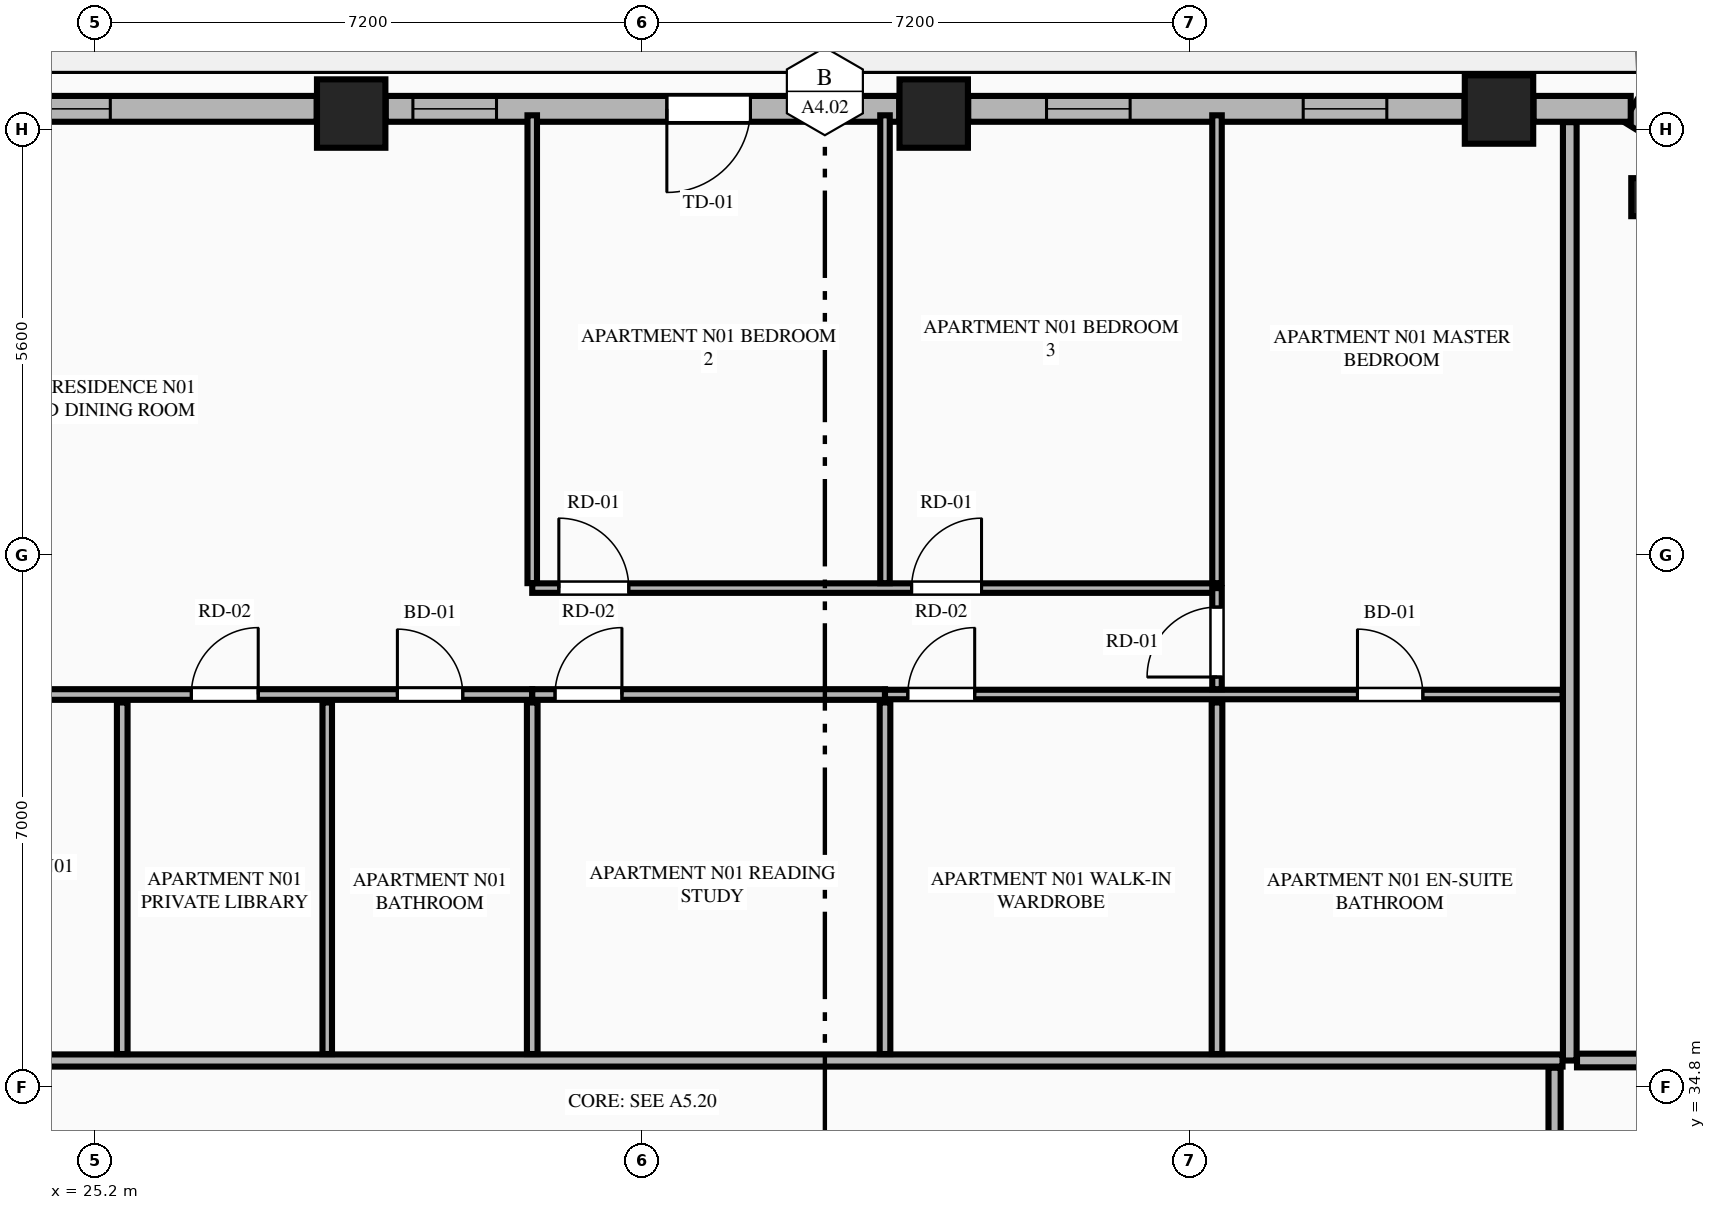
"""IFC4 building model, lengths in metres.
Left out: names, types, materials, properties, quantities, classifications, styles, units other than length and angle.
Written with IfcOpenShell. Run it as: python <this file> out.ifc"""

import sys

from ifc_helpers import new_model, si_unit, direction, frame, frame_2d, origin, origin_2d, place, context, subcontext, project, spatial, rectangle, extrude, element, fill, save


model = new_model("IFC4")
c1 = context("Model", 3, precision=1e-05, world=origin(), true_north=direction((0.0, 1.0)))
c2 = subcontext(c1, "Body", "Model", "MODEL_VIEW")
j1 = project(units=[si_unit("LENGTHUNIT", "METRE"), si_unit("PLANEANGLEUNIT", "RADIAN")], contexts=[c1])
p1 = place(None, origin())
s1 = spatial("IfcSite", under=j1, at=p1, CompositionType="ELEMENT")
p2 = place(p1, origin())
s2 = spatial("IfcBuilding", under=s1, at=p2, CompositionType="ELEMENT")
p3 = place(p2, frame((0.0, 0.0, 157.05)))
s3 = spatial("IfcBuildingStorey", under=s2, at=p3, CompositionType="ELEMENT", Elevation=157.05)
for number, where, z_axis, x_axis in (
    (1, (43.669, 47.661, 0.0), (0.0, 0.0, 1.0), (1.0, 0.0, 0.0)),
    (2, (36.232, 47.608, 0.0), (0.0, 0.0, 1.0), (1.0, 0.0, 0.0)),
    (3, (28.568, 47.608, 0.0), (0.0, 0.0, 1.0), (1.0, 0.0, 0.0)),
):
    element("IfcColumn", number, at=place(p3, frame(where, z_axis=z_axis, x_axis=x_axis)), inside=s3, PredefinedType="COLUMN", context=c2, shape_type="SweptSolid", body=[
        extrude(rectangle(XDim=0.9, YDim=0.9, at=origin_2d()), origin(), (0.0, 0.0, 1.0), 3.55),
    ])
p4 = place(p3, frame((45.659, 46.508, 0.0), z_axis=(0.0, 0.0, 1.0), x_axis=(-0.865160173452, 0.501495637342, 0.0)))
e4 = element("IfcColumn", 4, at=p4, inside=s3, PredefinedType="PILASTER", context=c2, shape_type="SweptSolid", body=[
    extrude(rectangle(XDim=0.5, YDim=0.35, at=origin_2d()), origin(), (0.0, 0.0, 1.0), 3.55),
])
p5 = place(p3, frame((46.971, 46.677, 0.0), z_axis=(0.0, 0.0, 1.0), x_axis=(-0.851798915137, 0.523868884523, 0.0)))
e5 = element("IfcWall", 5, at=p5, inside=s3, PredefinedType="STANDARD", context=c2, shape_type="SweptSolid", body=[
    extrude(rectangle(XDim=1.848, YDim=0.34, at=frame_2d((0.924, 0.0))), origin(), (0.0, 0.0, 1.0), 3.34),
])
p6 = place(p3, frame((45.402, 47.67, 0.0), z_axis=(0.0, 0.0, 1.0), x_axis=(-1.0, 0.0, 0.0)))
e6 = element("IfcWall", 6, at=p6, inside=s3, PredefinedType="STANDARD", context=c2, shape_type="SweptSolid", body=[
    extrude(rectangle(XDim=1.279, YDim=0.34, at=frame_2d((0.64, 0.0))), origin(), (0.0, 0.0, 1.0), 3.34),
])
p7 = place(p3, frame((43.215, 47.67, 0.0), z_axis=(0.0, 0.0, 1.0), x_axis=(-1.0, 0.0, 0.0)))
e7 = element("IfcWall", 7, at=p7, inside=s3, PredefinedType="STANDARD", context=c2, shape_type="SweptSolid", body=[
    extrude(rectangle(XDim=6.529, YDim=0.34, at=frame_2d((3.265, 0.0))), origin(), (0.0, 0.0, 1.0), 2.797),
])
p8 = place(p7, frame((1.022, 0.0, 0.75)))
e8 = element("IfcOpeningElement", 8, at=p8, cuts=e7, PredefinedType="OPENING", context=c2, shape_type="SweptSolid", body=[
    extrude(rectangle(XDim=1.1, YDim=1.897, at=frame_2d((0.55, 0.948))), frame((0.0, 0.18, 0.0), z_axis=(0.0, -1.0, 0.0), x_axis=(1.0, 0.0, 0.0)), (0.0, 0.0, 1.0), 0.36),
])
p9 = place(p7, frame((4.399, 0.0, 0.75)))
e9 = element("IfcOpeningElement", 9, at=p9, cuts=e7, PredefinedType="OPENING", context=c2, shape_type="SweptSolid", body=[
    extrude(rectangle(XDim=1.1, YDim=1.897, at=frame_2d((0.55, 0.948))), frame((0.0, 0.18, 0.0), z_axis=(0.0, -1.0, 0.0), x_axis=(1.0, 0.0, 0.0)), (0.0, 0.0, 1.0), 0.36),
])
p10 = place(p3, frame((35.778, 47.67, 0.0), z_axis=(0.0, 0.0, 1.0), x_axis=(-1.0, 0.0, 0.0)))
e10 = element("IfcWall", 10, at=p10, inside=s3, PredefinedType="STANDARD", context=c2, shape_type="SweptSolid", body=[
    extrude(rectangle(XDim=6.756, YDim=0.34, at=frame_2d((3.378, 0.0))), origin(), (0.0, 0.0, 1.0), 2.797),
])
p11 = place(p10, frame((1.957, 0.0, 0.0)))
e11 = element("IfcOpeningElement", 11, at=p11, cuts=e10, PredefinedType="OPENING", context=c2, shape_type="SweptSolid", body=[
    extrude(rectangle(XDim=1.1, YDim=2.25, at=frame_2d((0.55, 1.125))), frame((0.0, 0.18, 0.0), z_axis=(0.0, -1.0, 0.0), x_axis=(1.0, 0.0, 0.0)), (0.0, 0.0, 1.0), 0.36),
])
p12 = place(p10, frame((5.298, 0.0, 0.75)))
e12 = element("IfcOpeningElement", 12, at=p12, cuts=e10, PredefinedType="OPENING", context=c2, shape_type="SweptSolid", body=[
    extrude(rectangle(XDim=1.1, YDim=1.897, at=frame_2d((0.55, 0.948))), frame((0.0, 0.18, 0.0), z_axis=(0.0, -1.0, 0.0), x_axis=(1.0, 0.0, 0.0)), (0.0, 0.0, 1.0), 0.36),
])
p13 = place(p3, frame((28.114, 47.67, 0.0), z_axis=(0.0, 0.0, 1.0), x_axis=(-1.0, 0.0, 0.0)))
e13 = element("IfcWall", 13, at=p13, inside=s3, PredefinedType="STANDARD", context=c2, shape_type="SweptSolid", body=[
    extrude(rectangle(XDim=6.529, YDim=0.34, at=frame_2d((3.265, 0.0))), origin(), (0.0, 0.0, 1.0), 2.797),
])
p14 = place(p13, frame((2.715, 0.0, 0.75)))
e14 = element("IfcOpeningElement", 14, at=p14, cuts=e13, PredefinedType="OPENING", context=c2, shape_type="SweptSolid", body=[
    extrude(rectangle(XDim=1.1, YDim=1.897, at=frame_2d((0.55, 0.948))), frame((0.0, 0.18, 0.0), z_axis=(0.0, -1.0, 0.0), x_axis=(1.0, 0.0, 0.0)), (0.0, 0.0, 1.0), 0.36),
])
p15 = place(p3, frame((44.6, 35.15, 0.0), z_axis=(0.0, 0.0, 1.0), x_axis=(0.0, 1.0, 0.0)))
e15 = element("IfcWall", 15, at=p15, inside=s3, PredefinedType="PARTITIONING", context=c2, shape_type="SweptSolid", body=[
    extrude(rectangle(XDim=12.345, YDim=0.18, at=frame_2d((6.173, 0.0))), origin(), (0.0, 0.0, 1.0), 3.34),
])
p16 = place(p3, frame((20.295, 35.15, 0.0), z_axis=(0.0, 0.0, 1.0), x_axis=(1.0, 0.0, 0.0)))
e16 = element("IfcWall", 16, at=p16, inside=s3, PredefinedType="PARTITIONING", context=c2, shape_type="SweptSolid", body=[
    extrude(rectangle(XDim=24.21, YDim=0.16, at=frame_2d((12.105, 0.0))), origin(), (0.0, 0.0, 1.0), 3.34),
])
p17 = place(p16, frame((0.405, 0.0, 0.0)))
e17 = element("IfcOpeningElement", 17, at=p17, cuts=e16, PredefinedType="OPENING", context=c2, shape_type="SweptSolid", body=[
    extrude(rectangle(XDim=1.35, YDim=2.35, at=frame_2d((0.675, 1.175))), frame((0.0, 0.09, 0.0), z_axis=(0.0, -1.0, 0.0), x_axis=(1.0, 0.0, 0.0)), (0.0, 0.0, 1.0), 0.18),
])
p18 = place(p3, frame((22.25, 39.965, 0.0), z_axis=(0.0, 0.0, 1.0), x_axis=(1.0, 0.0, 0.0)))
e18 = element("IfcWall", 18, at=p18, inside=s3, PredefinedType="PLUMBINGWALL", context=c2, shape_type="SweptSolid", body=[
    extrude(rectangle(XDim=8.7, YDim=0.14, at=frame_2d((4.35, 0.0))), origin(), (0.0, 0.0, 1.0), 3.34),
])
p19 = place(p18, frame((6.926, 0.0, 0.0)))
e19 = element("IfcOpeningElement", 19, at=p19, cuts=e18, PredefinedType="OPENING", context=c2, shape_type="SweptSolid", body=[
    extrude(rectangle(XDim=0.86, YDim=2.1, at=frame_2d((0.43, 1.05))), frame((0.0, 0.08, 0.0), z_axis=(0.0, -1.0, 0.0), x_axis=(1.0, 0.0, 0.0)), (0.0, 0.0, 1.0), 0.16),
])
p20 = place(p18, frame((0.26, 0.0, 0.0)))
e20 = element("IfcOpeningElement", 20, at=p20, cuts=e18, PredefinedType="OPENING", context=c2, shape_type="SweptSolid", body=[
    extrude(rectangle(XDim=0.88, YDim=2.15, at=frame_2d((0.44, 1.075))), frame((0.0, 0.08, 0.0), z_axis=(0.0, -1.0, 0.0), x_axis=(1.0, 0.0, 0.0)), (0.0, 0.0, 1.0), 0.16),
])
p21 = place(p18, frame((4.215, 0.0, 0.0)))
e21 = element("IfcOpeningElement", 21, at=p21, cuts=e18, PredefinedType="OPENING", context=c2, shape_type="SweptSolid", body=[
    extrude(rectangle(XDim=0.88, YDim=2.15, at=frame_2d((0.44, 1.075))), frame((0.0, 0.08, 0.0), z_axis=(0.0, -1.0, 0.0), x_axis=(1.0, 0.0, 0.0)), (0.0, 0.0, 1.0), 0.16),
])
p22 = place(p3, frame((30.95, 39.965, 0.0), z_axis=(0.0, 0.0, 1.0), x_axis=(1.0, 0.0, 0.0)))
e22 = element("IfcWall", 22, at=p22, inside=s3, PredefinedType="PLUMBINGWALL", context=c2, shape_type="SweptSolid", body=[
    extrude(rectangle(XDim=4.641, YDim=0.14, at=frame_2d((2.321, 0.0))), origin(), (0.0, 0.0, 1.0), 3.34),
])
p23 = place(p22, frame((0.3, 0.0, 0.0)))
e23 = element("IfcOpeningElement", 23, at=p23, cuts=e22, PredefinedType="OPENING", context=c2, shape_type="SweptSolid", body=[
    extrude(rectangle(XDim=0.88, YDim=2.15, at=frame_2d((0.44, 1.075))), frame((0.0, 0.08, 0.0), z_axis=(0.0, -1.0, 0.0), x_axis=(1.0, 0.0, 0.0)), (0.0, 0.0, 1.0), 0.16),
])
p24 = place(p3, frame((35.591, 39.965, 0.0), z_axis=(0.0, 0.0, 1.0), x_axis=(1.0, 0.0, 0.0)))
e24 = element("IfcWall", 24, at=p24, inside=s3, PredefinedType="PARTITIONING", context=c2, shape_type="SweptSolid", body=[
    extrude(rectangle(XDim=8.914, YDim=0.125, at=frame_2d((4.457, 0.0))), origin(), (0.0, 0.0, 1.0), 3.34),
])
p25 = place(p24, frame((6.216, 0.0, 0.0)))
e25 = element("IfcOpeningElement", 25, at=p25, cuts=e24, PredefinedType="OPENING", context=c2, shape_type="SweptSolid", body=[
    extrude(rectangle(XDim=0.86, YDim=2.1, at=frame_2d((0.43, 1.05))), frame((0.0, 0.073, 0.0), z_axis=(0.0, -1.0, 0.0), x_axis=(1.0, 0.0, 0.0)), (0.0, 0.0, 1.0), 0.145),
])
p26 = place(p24, frame((0.3, 0.0, 0.0)))
e26 = element("IfcOpeningElement", 26, at=p26, cuts=e24, PredefinedType="OPENING", context=c2, shape_type="SweptSolid", body=[
    extrude(rectangle(XDim=0.88, YDim=2.15, at=frame_2d((0.44, 1.075))), frame((0.0, 0.073, 0.0), z_axis=(0.0, -1.0, 0.0), x_axis=(1.0, 0.0, 0.0)), (0.0, 0.0, 1.0), 0.145),
])
p27 = place(p3, frame((25.556, 35.235, 0.0), z_axis=(0.0, 0.0, 1.0), x_axis=(0.0, 1.0, 0.0)))
e27 = element("IfcWall", 27, at=p27, inside=s3, PredefinedType="PLUMBINGWALL", context=c2, shape_type="SweptSolid", body=[
    extrude(rectangle(XDim=4.625, YDim=0.14, at=frame_2d((2.312, 0.0))), origin(), (0.0, 0.0, 1.0), 3.34),
])
p28 = place(p3, frame((28.253, 35.235, 0.0), z_axis=(0.0, 0.0, 1.0), x_axis=(0.0, 1.0, 0.0)))
e28 = element("IfcWall", 28, at=p28, inside=s3, PredefinedType="PARTITIONING", context=c2, shape_type="SweptSolid", body=[
    extrude(rectangle(XDim=4.625, YDim=0.125, at=frame_2d((2.312, 0.0))), origin(), (0.0, 0.0, 1.0), 3.34),
])
p29 = place(p3, frame((30.95, 41.43, 0.0), z_axis=(0.0, 0.0, 1.0), x_axis=(0.0, 1.0, 0.0)))
e29 = element("IfcWall", 29, at=p29, inside=s3, PredefinedType="PARTITIONING", context=c2, shape_type="SweptSolid", body=[
    extrude(rectangle(XDim=6.155, YDim=0.125, at=frame_2d((3.078, 0.0))), origin(), (0.0, 0.0, 1.0), 3.34),
])
p30 = place(p3, frame((30.95, 41.365, 0.0), z_axis=(0.0, 0.0, 1.0), x_axis=(1.0, 0.0, 0.0)))
e30 = element("IfcWall", 30, at=p30, inside=s3, PredefinedType="PARTITIONING", context=c2, shape_type="SweptSolid", body=[
    extrude(rectangle(XDim=9.009, YDim=0.125, at=frame_2d((4.504, 0.0))), origin(), (0.0, 0.0, 1.0), 3.34),
])
p31 = place(p30, frame((0.35, 0.0, 0.0)))
e31 = element("IfcOpeningElement", 31, at=p31, cuts=e30, PredefinedType="OPENING", context=c2, shape_type="SweptSolid", body=[
    extrude(rectangle(XDim=0.92, YDim=2.15, at=frame_2d((0.46, 1.075))), frame((0.0, 0.073, 0.0), z_axis=(0.0, -1.0, 0.0), x_axis=(1.0, 0.0, 0.0)), (0.0, 0.0, 1.0), 0.145),
])
p32 = place(p30, frame((4.991, 0.0, 0.0)))
e32 = element("IfcOpeningElement", 32, at=p32, cuts=e30, PredefinedType="OPENING", context=c2, shape_type="SweptSolid", body=[
    extrude(rectangle(XDim=0.92, YDim=2.15, at=frame_2d((0.46, 1.075))), frame((0.0, 0.073, 0.0), z_axis=(0.0, -1.0, 0.0), x_axis=(1.0, 0.0, 0.0)), (0.0, 0.0, 1.0), 0.145),
])
p33 = place(p3, frame((39.959, 40.035, 0.0), z_axis=(0.0, 0.0, 1.0), x_axis=(0.0, 1.0, 0.0)))
e33 = element("IfcWall", 33, at=p33, inside=s3, PredefinedType="PARTITIONING", context=c2, shape_type="SweptSolid", body=[
    extrude(rectangle(XDim=1.33, YDim=0.125, at=frame_2d((0.665, 0.0))), origin(), (0.0, 0.0, 1.0), 3.34),
])
p34 = place(p33, frame((0.16, 0.0, 0.0)))
e34 = element("IfcOpeningElement", 34, at=p34, cuts=e33, PredefinedType="OPENING", context=c2, shape_type="SweptSolid", body=[
    extrude(rectangle(XDim=0.92, YDim=2.15, at=frame_2d((0.46, 1.075))), frame((0.0, 0.073, 0.0), z_axis=(0.0, -1.0, 0.0), x_axis=(1.0, 0.0, 0.0)), (0.0, 0.0, 1.0), 0.145),
])
for number, where, z_axis, x_axis in (
    (35, (30.95, 35.235, 0.0), (0.0, 0.0, 1.0), (0.0, 1.0, 0.0)),
    (36, (35.591, 35.235, 0.0), (0.0, 0.0, 1.0), (0.0, 1.0, 0.0)),
):
    element("IfcWall", number, at=place(p3, frame(where, z_axis=z_axis, x_axis=x_axis)), inside=s3, PredefinedType="PLUMBINGWALL", context=c2, shape_type="SweptSolid", body=[
        extrude(rectangle(XDim=4.625, YDim=0.14, at=frame_2d((2.312, 0.0))), origin(), (0.0, 0.0, 1.0), 3.34),
    ])
for number, where, z_axis, x_axis in (
    (37, (35.591, 41.43, 0.0), (0.0, 0.0, 1.0), (0.0, 1.0, 0.0)),
    (38, (39.959, 41.43, 0.0), (0.0, 0.0, 1.0), (0.0, 1.0, 0.0)),
):
    element("IfcWall", number, at=place(p3, frame(where, z_axis=z_axis, x_axis=x_axis)), inside=s3, PredefinedType="PARTITIONING", context=c2, shape_type="SweptSolid", body=[
        extrude(rectangle(XDim=6.155, YDim=0.125, at=frame_2d((3.078, 0.0))), origin(), (0.0, 0.0, 1.0), 3.34),
    ])
p35 = place(p3, frame((39.959, 35.235, 0.0), z_axis=(0.0, 0.0, 1.0), x_axis=(0.0, 1.0, 0.0)))
e39 = element("IfcWall", 39, at=p35, inside=s3, PredefinedType="PLUMBINGWALL", context=c2, shape_type="SweptSolid", body=[
    extrude(rectangle(XDim=4.625, YDim=0.14, at=frame_2d((2.312, 0.0))), origin(), (0.0, 0.0, 1.0), 3.34),
])
p36 = place(p3, frame((44.695, 35.15, 0.0), z_axis=(0.0, 0.0, 1.0), x_axis=(1.0, 0.0, 0.0)))
e40 = element("IfcWall", 40, at=p36, inside=s3, PredefinedType="PARTITIONING", context=c2, shape_type="SweptSolid", body=[
    extrude(rectangle(XDim=7.895, YDim=0.18, at=frame_2d((3.948, 0.0))), origin(), (0.0, 0.0, 1.0), 3.34),
])
p37 = place(p3, frame((44.4, 16.745, 0.0), z_axis=(0.0, 0.0, 1.0), x_axis=(0.0, 1.0, 0.0)))
e41 = element("IfcWall", 41, at=p37, inside=s3, PredefinedType="PARTITIONING", context=c2, shape_type="SweptSolid", body=[
    extrude(rectangle(XDim=18.31, YDim=0.16, at=frame_2d((9.155, 0.0))), origin(), (0.0, 0.0, 1.0), 3.34),
])
p38 = place(p37, frame((0.45, 0.0, 0.0)))
e42 = element("IfcOpeningElement", 42, at=p38, cuts=e41, PredefinedType="OPENING", context=c2, shape_type="SweptSolid", body=[
    extrude(rectangle(XDim=1.02, YDim=2.25, at=frame_2d((0.51, 1.125))), frame((0.0, 0.09, 0.0), z_axis=(0.0, -1.0, 0.0), x_axis=(1.0, 0.0, 0.0)), (0.0, 0.0, 1.0), 0.18),
])
p39 = place(p8, origin())
e43 = element("IfcWindow", 43, at=p39, inside=s3, PartitioningType="SINGLE_PANEL", PredefinedType="WINDOW", context=c2, shape_type="SweptSolid", body=[
    extrude(rectangle(XDim=1.1, YDim=1.897, at=frame_2d((0.55, 0.948))), frame((0.0, 0.03, 0.0), z_axis=(0.0, -1.0, 0.0), x_axis=(1.0, 0.0, 0.0)), (0.0, 0.0, 1.0), 0.06),
])
fill(e8, e43)
p40 = place(p11, origin())
e44 = element("IfcDoor", 44, at=p40, inside=s3, OperationType="SINGLE_SWING_RIGHT", PredefinedType="DOOR", context=c2, shape_type="SweptSolid", body=[
    extrude(rectangle(XDim=1.1, YDim=2.25, at=frame_2d((0.55, 1.125))), frame((0.0, 0.025, 0.0), z_axis=(0.0, -1.0, 0.0), x_axis=(1.0, 0.0, 0.0)), (0.0, 0.0, 1.0), 0.05),
])
fill(e11, e44)
p41 = place(p14, origin())
e45 = element("IfcWindow", 45, at=p41, inside=s3, PartitioningType="SINGLE_PANEL", PredefinedType="WINDOW", context=c2, shape_type="SweptSolid", body=[
    extrude(rectangle(XDim=1.1, YDim=1.897, at=frame_2d((0.55, 0.948))), frame((0.0, 0.03, 0.0), z_axis=(0.0, -1.0, 0.0), x_axis=(1.0, 0.0, 0.0)), (0.0, 0.0, 1.0), 0.06),
])
fill(e14, e45)
p42 = place(p19, origin())
e46 = element("IfcDoor", 46, at=p42, inside=s3, OperationType="SINGLE_SWING_LEFT", PredefinedType="DOOR", context=c2, shape_type="SweptSolid", body=[
    extrude(rectangle(XDim=0.86, YDim=2.1, at=frame_2d((0.43, 1.05))), frame((0.0, 0.025, 0.0), z_axis=(0.0, -1.0, 0.0), x_axis=(1.0, 0.0, 0.0)), (0.0, 0.0, 1.0), 0.05),
])
fill(e19, e46)
p43 = place(p25, origin())
e47 = element("IfcDoor", 47, at=p43, inside=s3, OperationType="SINGLE_SWING_LEFT", PredefinedType="DOOR", context=c2, shape_type="SweptSolid", body=[
    extrude(rectangle(XDim=0.86, YDim=2.1, at=frame_2d((0.43, 1.05))), frame((0.0, 0.025, 0.0), z_axis=(0.0, -1.0, 0.0), x_axis=(1.0, 0.0, 0.0)), (0.0, 0.0, 1.0), 0.05),
])
fill(e25, e47)
p44 = place(p21, origin())
e48 = element("IfcDoor", 48, at=p44, inside=s3, OperationType="SINGLE_SWING_RIGHT", PredefinedType="DOOR", context=c2, shape_type="SweptSolid", body=[
    extrude(rectangle(XDim=0.88, YDim=2.15, at=frame_2d((0.44, 1.075))), frame((0.0, 0.025, 0.0), z_axis=(0.0, -1.0, 0.0), x_axis=(1.0, 0.0, 0.0)), (0.0, 0.0, 1.0), 0.05),
])
fill(e21, e48)
p45 = place(p23, origin())
e49 = element("IfcDoor", 49, at=p45, inside=s3, OperationType="SINGLE_SWING_RIGHT", PredefinedType="DOOR", context=c2, shape_type="SweptSolid", body=[
    extrude(rectangle(XDim=0.88, YDim=2.15, at=frame_2d((0.44, 1.075))), frame((0.0, 0.025, 0.0), z_axis=(0.0, -1.0, 0.0), x_axis=(1.0, 0.0, 0.0)), (0.0, 0.0, 1.0), 0.05),
])
fill(e23, e49)
p46 = place(p31, origin())
e50 = element("IfcDoor", 50, at=p46, inside=s3, OperationType="SINGLE_SWING_LEFT", PredefinedType="DOOR", context=c2, shape_type="SweptSolid", body=[
    extrude(rectangle(XDim=0.92, YDim=2.15, at=frame_2d((0.46, 1.075))), frame((0.0, 0.025, 0.0), z_axis=(0.0, -1.0, 0.0), x_axis=(1.0, 0.0, 0.0)), (0.0, 0.0, 1.0), 0.05),
])
fill(e31, e50)
p47 = place(p32, origin())
e51 = element("IfcDoor", 51, at=p47, inside=s3, OperationType="SINGLE_SWING_RIGHT", PredefinedType="DOOR", context=c2, shape_type="SweptSolid", body=[
    extrude(rectangle(XDim=0.92, YDim=2.15, at=frame_2d((0.46, 1.075))), frame((0.0, 0.025, 0.0), z_axis=(0.0, -1.0, 0.0), x_axis=(1.0, 0.0, 0.0)), (0.0, 0.0, 1.0), 0.05),
])
fill(e32, e51)
p48 = place(p34, origin())
e52 = element("IfcDoor", 52, at=p48, inside=s3, OperationType="SINGLE_SWING_LEFT", PredefinedType="DOOR", context=c2, shape_type="SweptSolid", body=[
    extrude(rectangle(XDim=0.92, YDim=2.15, at=frame_2d((0.46, 1.075))), frame((0.0, 0.025, 0.0), z_axis=(0.0, -1.0, 0.0), x_axis=(1.0, 0.0, 0.0)), (0.0, 0.0, 1.0), 0.05),
])
fill(e34, e52)
p49 = place(p26, origin())
e53 = element("IfcDoor", 53, at=p49, inside=s3, OperationType="SINGLE_SWING_RIGHT", PredefinedType="DOOR", context=c2, shape_type="SweptSolid", body=[
    extrude(rectangle(XDim=0.88, YDim=2.15, at=frame_2d((0.44, 1.075))), frame((0.0, 0.025, 0.0), z_axis=(0.0, -1.0, 0.0), x_axis=(1.0, 0.0, 0.0)), (0.0, 0.0, 1.0), 0.05),
])
fill(e26, e53)
p50 = place(p9, origin())
e54 = element("IfcWindow", 54, at=p50, inside=s3, PartitioningType="SINGLE_PANEL", PredefinedType="WINDOW", context=c2, shape_type="SweptSolid", body=[
    extrude(rectangle(XDim=1.1, YDim=1.897, at=frame_2d((0.55, 0.948))), frame((0.0, 0.03, 0.0), z_axis=(0.0, -1.0, 0.0), x_axis=(1.0, 0.0, 0.0)), (0.0, 0.0, 1.0), 0.06),
])
fill(e9, e54)
p51 = place(p12, origin())
e55 = element("IfcWindow", 55, at=p51, inside=s3, PartitioningType="SINGLE_PANEL", PredefinedType="WINDOW", context=c2, shape_type="SweptSolid", body=[
    extrude(rectangle(XDim=1.1, YDim=1.897, at=frame_2d((0.55, 0.948))), frame((0.0, 0.03, 0.0), z_axis=(0.0, -1.0, 0.0), x_axis=(1.0, 0.0, 0.0)), (0.0, 0.0, 1.0), 0.06),
])
fill(e12, e55)
save(model, sys.argv[1])
